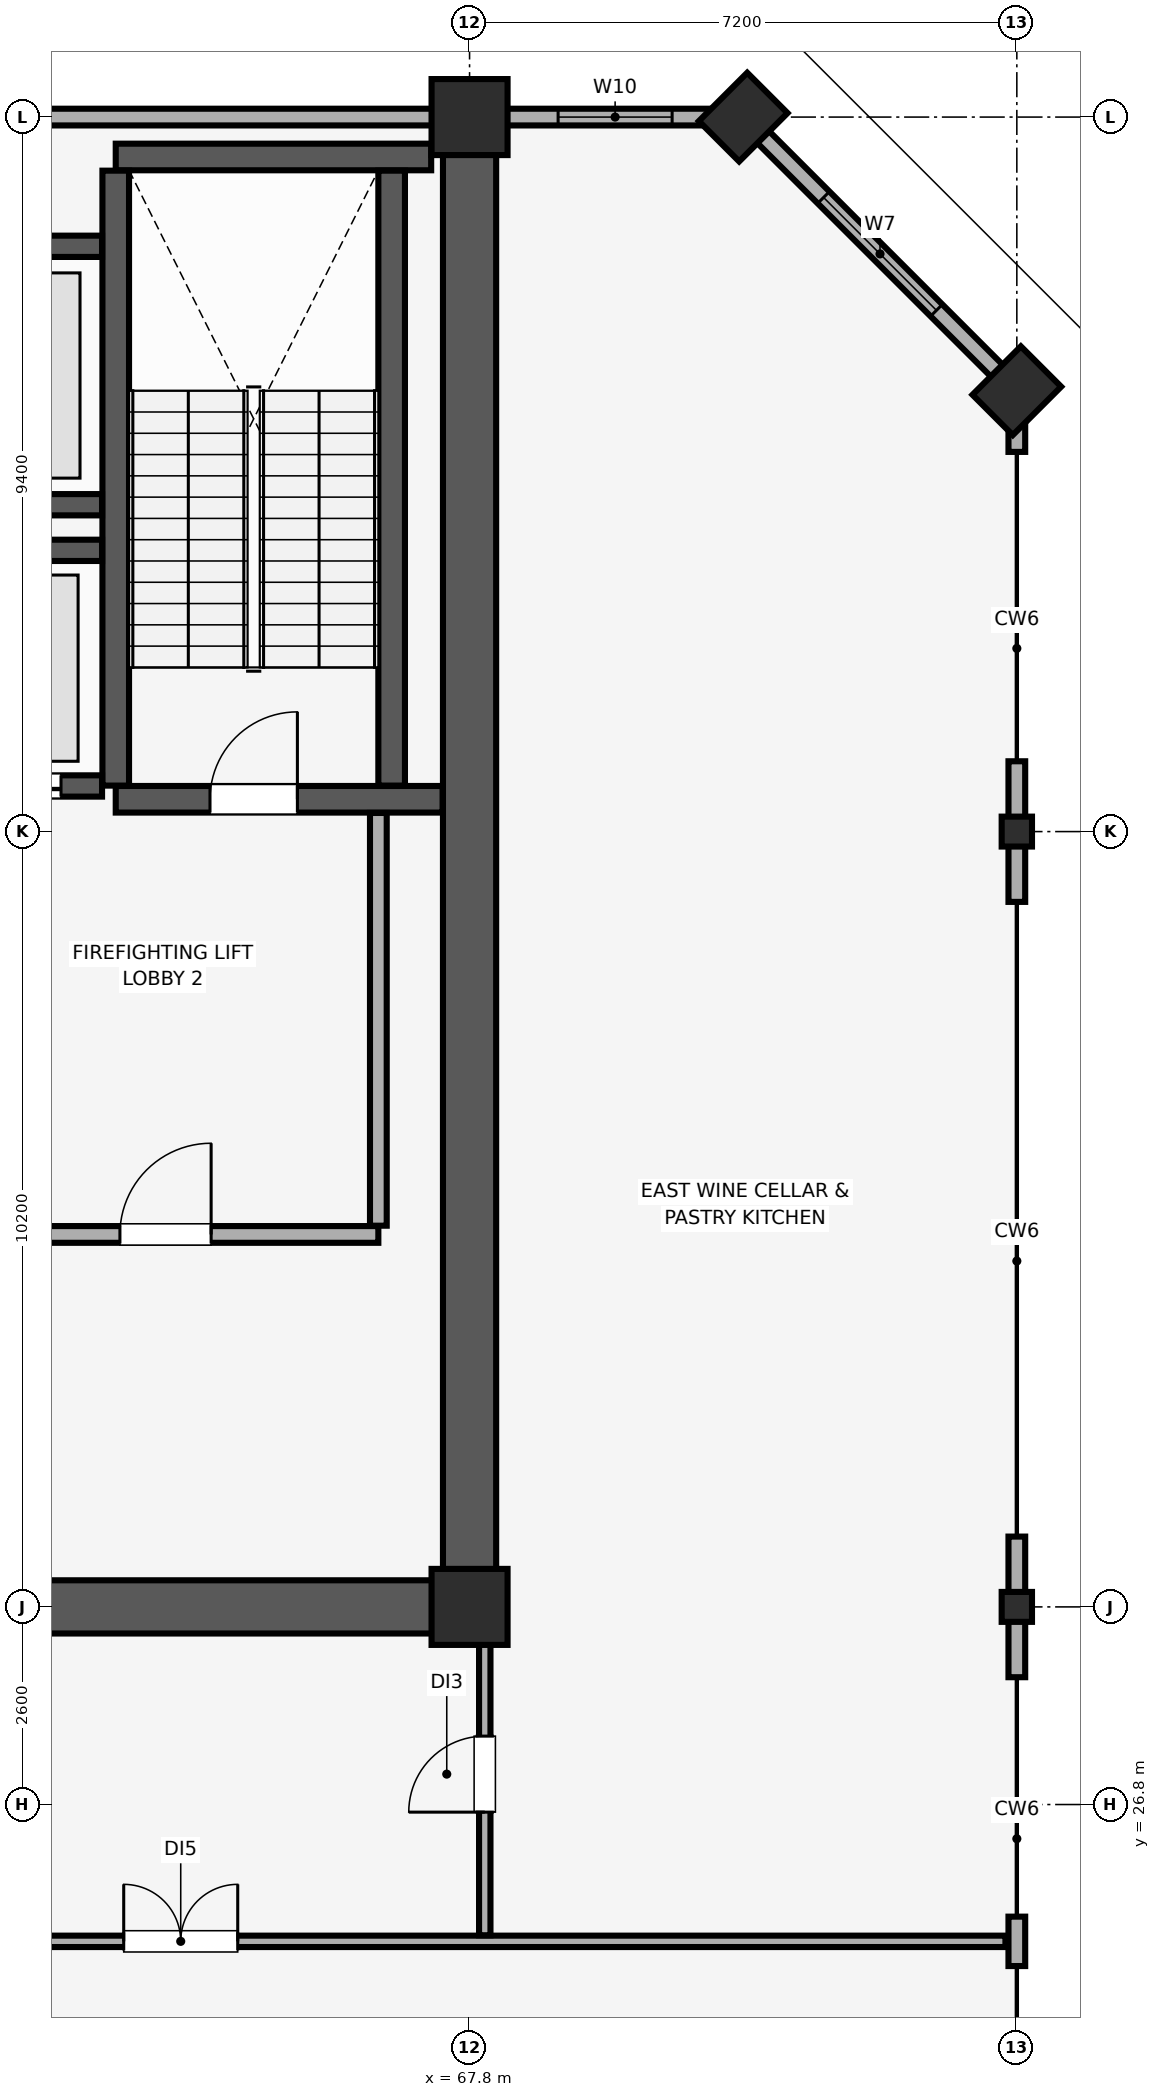
"""IFC4 building model, lengths in metres.
Left out: names, types, materials, properties, quantities, classifications, styles, units other than length and angle.
Written with IfcOpenShell. Run it as: python <this file> out.ifc"""

import sys

from ifc_helpers import new_model, si_unit, direction, frame, frame_2d, origin, origin_2d, place, context, subcontext, project, spatial, rectangle, i_section, extrude, element, fill, save


model = new_model("IFC4")
c1 = context("Model", 3, precision=1e-05, world=origin(), true_north=direction((0.0, 1.0)))
c2 = subcontext(c1, "Body", "Model", "MODEL_VIEW")
j1 = project(units=[si_unit("LENGTHUNIT", "METRE"), si_unit("PLANEANGLEUNIT", "RADIAN")], contexts=[c1])
p1 = place(None, origin())
s1 = spatial("IfcSite", under=j1, at=p1, CompositionType="ELEMENT")
p2 = place(p1, origin())
s2 = spatial("IfcBuilding", under=s1, at=p2, CompositionType="ELEMENT")
p3 = place(p2, frame((0.0, 0.0, 305.7)))
s3 = spatial("IfcBuildingStorey", under=s2, at=p3, CompositionType="ELEMENT", Elevation=305.7)
for number, where, z_axis, x_axis in (
    (1, (75.0, 29.4, 0.0), (0.0, 0.0, 1.0), (1.0, 0.0, 0.0)),
    (2, (75.0, 39.6, 0.0), (0.0, 0.0, 1.0), (1.0, 0.0, 0.0)),
):
    element("IfcColumn", number, at=place(p3, frame(where, z_axis=z_axis, x_axis=x_axis)), inside=s3, PredefinedType="COLUMN", context=c2, shape_type="SweptSolid", body=[
        extrude(i_section(OverallWidth=0.399, OverallDepth=0.394, WebThickness=0.023, FlangeThickness=0.037, FilletRadius=0.015, at=origin_2d()), origin(), (0.0, 0.0, 1.0), 4.7),
    ])
for number, where, z_axis, x_axis in (
    (3, (75.0, 45.4, 0.0), (0.0, 0.0, 1.0), (0.707, 0.707, 0.0)),
    (4, (71.4, 49.0, 0.0), (0.0, 0.0, 1.0), (0.707, 0.707, 0.0)),
):
    element("IfcColumn", number, at=place(p3, frame(where, z_axis=z_axis, x_axis=x_axis)), inside=s3, PredefinedType="PILASTER", context=c2, shape_type="SweptSolid", body=[
        extrude(rectangle(XDim=0.9, YDim=0.75, at=origin_2d()), origin(), (0.0, 0.0, 1.0), 4.7),
    ])
for number, where, z_axis, x_axis in (
    (5, (67.8, 29.4, 0.0), (0.0, 0.0, 1.0), (1.0, 0.0, 0.0)),
    (6, (67.8, 49.0, 0.0), (0.0, 0.0, 1.0), (1.0, 0.0, 0.0)),
):
    element("IfcColumn", number, at=place(p3, frame(where, z_axis=z_axis, x_axis=x_axis)), inside=s3, PredefinedType="COLUMN", context=c2, shape_type="SweptSolid", body=[
        extrude(rectangle(XDim=1.0, YDim=1.0, at=origin_2d()), origin(), (0.0, 0.0, 1.0), 4.7),
    ])
p4 = place(p3, frame((75.0, 24.675, 0.0), z_axis=(0.0, 0.0, 1.0), x_axis=(0.0, 1.0, 0.0)))
e7 = element("IfcWall", 7, at=p4, inside=s3, PredefinedType="SOLIDWALL", context=c2, shape_type="SweptSolid", body=[
    extrude(rectangle(XDim=0.65, YDim=0.22, at=frame_2d((0.325, 0.0))), origin(), (0.0, 0.0, 1.0), 3.9),
])
for number, where, z_axis, x_axis in (
    (8, (75.0, 28.475, 0.0), (0.0, 0.0, 1.0), (0.0, 1.0, 0.0)),
    (9, (75.0, 38.675, 0.0), (0.0, 0.0, 1.0), (0.0, 1.0, 0.0)),
):
    element("IfcWall", number, at=place(p3, frame(where, z_axis=z_axis, x_axis=x_axis)), inside=s3, PredefinedType="SOLIDWALL", context=c2, shape_type="SweptSolid", body=[
        extrude(rectangle(XDim=1.85, YDim=0.22, at=frame_2d((0.925, 0.0))), origin(), (0.0, 0.0, 1.0), 3.9),
    ])
p5 = place(p3, frame((75.0, 44.595, 0.0), z_axis=(0.0, 0.0, 1.0), x_axis=(0.0, 1.0, 0.0)))
e10 = element("IfcWall", 10, at=p5, inside=s3, PredefinedType="SOLIDWALL", context=c2, shape_type="SweptSolid", body=[
    extrude(rectangle(XDim=0.805, YDim=0.22, at=frame_2d((0.402, 0.0))), origin(), (0.0, 0.0, 1.0), 4.7),
])
p6 = place(p3, frame((75.0, 45.4, 0.0), z_axis=(0.0, 0.0, 1.0), x_axis=(-0.707106781187, 0.707106781187, 0.0)))
e11 = element("IfcWall", 11, at=p6, inside=s3, PredefinedType="SOLIDWALL", context=c2, shape_type="SweptSolid", body=[
    extrude(rectangle(XDim=5.091, YDim=0.22, at=frame_2d((2.546, 0.0))), origin(), (0.0, 0.0, 1.0), 3.9),
])
p7 = place(p6, frame((1.496, 0.0, 0.85)))
e12 = element("IfcOpeningElement", 12, at=p7, cuts=e11, PredefinedType="OPENING", context=c2, shape_type="SweptSolid", body=[
    extrude(rectangle(XDim=2.1, YDim=1.6, at=frame_2d((1.05, 0.8))), frame((0.0, 0.12, 0.0), z_axis=(0.0, -1.0, 0.0), x_axis=(1.0, 0.0, 0.0)), (0.0, 0.0, 1.0), 0.24),
])
p8 = place(p3, frame((71.4, 49.0, 0.0), z_axis=(0.0, 0.0, 1.0), x_axis=(-1.0, 0.0, 0.0)))
e13 = element("IfcWall", 13, at=p8, inside=s3, PredefinedType="SOLIDWALL", context=c2, shape_type="SweptSolid", body=[
    extrude(rectangle(XDim=58.8, YDim=0.22, at=frame_2d((29.4, 0.0))), origin(), (0.0, 0.0, 1.0), 3.9),
])
p9 = place(p8, frame((56.365, 0.0, 0.85)))
e14 = element("IfcOpeningElement", 14, at=p9, cuts=e13, PredefinedType="OPENING", context=c2, shape_type="SweptSolid", body=[
    extrude(rectangle(XDim=1.5, YDim=1.4, at=frame_2d((0.75, 0.7))), frame((0.0, 0.12, 0.0), z_axis=(0.0, -1.0, 0.0), x_axis=(1.0, 0.0, 0.0)), (0.0, 0.0, 1.0), 0.24),
])
p10 = place(p8, frame((0.935, 0.0, 0.85)))
e15 = element("IfcOpeningElement", 15, at=p10, cuts=e13, PredefinedType="OPENING", context=c2, shape_type="SweptSolid", body=[
    extrude(rectangle(XDim=1.5, YDim=1.4, at=frame_2d((0.75, 0.7))), frame((0.0, 0.12, 0.0), z_axis=(0.0, -1.0, 0.0), x_axis=(1.0, 0.0, 0.0)), (0.0, 0.0, 1.0), 0.24),
])
p11 = place(p8, frame((41.915, 0.0, 0.9)))
e16 = element("IfcOpeningElement", 16, at=p11, cuts=e13, PredefinedType="OPENING", context=c2, shape_type="SweptSolid", body=[
    extrude(rectangle(XDim=3.6, YDim=1.5, at=frame_2d((1.8, 0.75))), frame((0.0, 0.12, 0.0), z_axis=(0.0, -1.0, 0.0), x_axis=(1.0, 0.0, 0.0)), (0.0, 0.0, 1.0), 0.24),
])
p12 = place(p8, frame((35.7, 0.0, 0.9)))
e17 = element("IfcOpeningElement", 17, at=p12, cuts=e13, PredefinedType="OPENING", context=c2, shape_type="SweptSolid", body=[
    extrude(rectangle(XDim=2.4, YDim=1.5, at=frame_2d((1.2, 0.75))), frame((0.0, 0.12, 0.0), z_axis=(0.0, -1.0, 0.0), x_axis=(1.0, 0.0, 0.0)), (0.0, 0.0, 1.0), 0.24),
])
p13 = place(p8, frame((18.95, 0.0, 0.9)))
e18 = element("IfcOpeningElement", 18, at=p13, cuts=e13, PredefinedType="OPENING", context=c2, shape_type="SweptSolid", body=[
    extrude(rectangle(XDim=3.0, YDim=1.5, at=frame_2d((1.5, 0.75))), frame((0.0, 0.12, 0.0), z_axis=(0.0, -1.0, 0.0), x_axis=(1.0, 0.0, 0.0)), (0.0, 0.0, 1.0), 0.24),
])
p14 = place(p8, frame((14.635, 0.0, 0.9)))
e19 = element("IfcOpeningElement", 19, at=p14, cuts=e13, PredefinedType="OPENING", context=c2, shape_type="SweptSolid", body=[
    extrude(rectangle(XDim=2.4, YDim=1.5, at=frame_2d((1.2, 0.75))), frame((0.0, 0.12, 0.0), z_axis=(0.0, -1.0, 0.0), x_axis=(1.0, 0.0, 0.0)), (0.0, 0.0, 1.0), 0.24),
])
p15 = place(p3, frame((67.8, 29.4, 0.0), z_axis=(0.0, 0.0, 1.0), x_axis=(0.0, 1.0, 0.0)))
e20 = element("IfcWall", 20, at=p15, inside=s3, PredefinedType="SHEAR", context=c2, shape_type="SweptSolid", body=[
    extrude(rectangle(XDim=19.2, YDim=0.7, at=frame_2d((9.6, 0.0))), origin(), (0.0, 0.0, 1.0), 4.7),
])
p16 = place(p3, frame((60.4, 29.4, 0.0), z_axis=(0.0, 0.0, 1.0), x_axis=(1.0, 0.0, 0.0)))
e21 = element("IfcWall", 21, at=p16, inside=s3, PredefinedType="SHEAR", context=c2, shape_type="SweptSolid", body=[
    extrude(rectangle(XDim=7.045, YDim=0.7, at=frame_2d((3.522, 0.0))), origin(), (0.0, 0.0, 1.0), 4.7),
])
p17 = place(p3, frame((63.145, 40.025, 0.0), z_axis=(0.0, 0.0, 1.0), x_axis=(1.0, 0.0, 0.0)))
e22 = element("IfcWall", 22, at=p17, inside=s3, PredefinedType="SHEAR", context=c2, shape_type="SweptSolid", body=[
    extrude(rectangle(XDim=4.3, YDim=0.35, at=frame_2d((2.15, 0.0))), origin(), (0.0, 0.0, 1.0), 4.7),
])
p18 = place(p17, frame((1.24, 0.0, 0.0)))
e23 = element("IfcOpeningElement", 23, at=p18, cuts=e22, PredefinedType="OPENING", context=c2, shape_type="SweptSolid", body=[
    extrude(rectangle(XDim=1.15, YDim=2.15, at=frame_2d((0.575, 1.075))), frame((0.0, 0.185, 0.0), z_axis=(0.0, -1.0, 0.0), x_axis=(1.0, 0.0, 0.0)), (0.0, 0.0, 1.0), 0.37),
])
p19 = place(p3, frame((63.145, 48.475, 0.0), z_axis=(0.0, 0.0, 1.0), x_axis=(1.0, 0.0, 0.0)))
e24 = element("IfcWall", 24, at=p19, inside=s3, PredefinedType="SHEAR", context=c2, shape_type="SweptSolid", body=[
    extrude(rectangle(XDim=4.15, YDim=0.35, at=frame_2d((2.075, 0.0))), origin(), (0.0, 0.0, 1.0), 4.7),
])
for number, where, z_axis, x_axis in (
    (25, (63.145, 40.205, 0.0), (0.0, 0.0, 1.0), (0.0, 1.0, 0.0)),
    (26, (66.775, 40.205, 0.0), (0.0, 0.0, 1.0), (0.0, 1.0, 0.0)),
):
    element("IfcWall", number, at=place(p3, frame(where, z_axis=z_axis, x_axis=x_axis)), inside=s3, PredefinedType="SHEAR", context=c2, shape_type="SweptSolid", body=[
        extrude(rectangle(XDim=8.09, YDim=0.35, at=frame_2d((4.045, 0.0))), origin(), (0.0, 0.0, 1.0), 4.7),
    ])
p20 = place(p3, frame((60.55, 40.2, 0.0), z_axis=(0.0, 0.0, 1.0), x_axis=(1.0, 0.0, 0.0)))
e27 = element("IfcWall", 27, at=p20, inside=s3, PredefinedType="SHEAR", context=c2, shape_type="SweptSolid", body=[
    extrude(rectangle(XDim=2.415, YDim=0.28, at=frame_2d((1.208, 0.0))), origin(), (0.0, 0.0, 1.0), 4.7),
])
p21 = place(p20, frame((0.575, 0.0, 0.0)))
e28 = element("IfcOpeningElement", 28, at=p21, cuts=e27, PredefinedType="OPENING", context=c2, shape_type="SweptSolid", body=[
    extrude(rectangle(XDim=1.3, YDim=2.3, at=frame_2d((0.65, 1.15))), frame((0.0, 0.15, 0.0), z_axis=(0.0, -1.0, 0.0), x_axis=(1.0, 0.0, 0.0)), (0.0, 0.0, 1.0), 0.3),
])
for number, where, z_axis, x_axis in (
    (29, (60.55, 43.3, 0.0), (0.0, 0.0, 1.0), (1.0, 0.0, 0.0)),
    (30, (60.55, 43.9, 0.0), (0.0, 0.0, 1.0), (1.0, 0.0, 0.0)),
    (31, (60.55, 47.3, 0.0), (0.0, 0.0, 1.0), (1.0, 0.0, 0.0)),
):
    element("IfcWall", number, at=place(p3, frame(where, z_axis=z_axis, x_axis=x_axis)), inside=s3, PredefinedType="SHEAR", context=c2, shape_type="SweptSolid", body=[
        extrude(rectangle(XDim=2.415, YDim=0.28, at=frame_2d((1.208, 0.0))), origin(), (0.0, 0.0, 1.0), 4.7),
    ])
p22 = place(p3, frame((60.55, 34.3, 0.0), z_axis=(0.0, 0.0, 1.0), x_axis=(1.0, 0.0, 0.0)))
e32 = element("IfcWall", 32, at=p22, inside=s3, PredefinedType="PARTITIONING", context=c2, shape_type="SweptSolid", body=[
    extrude(rectangle(XDim=6.05, YDim=0.22, at=frame_2d((3.025, 0.0))), origin(), (0.0, 0.0, 1.0), 4.7),
])
p23 = place(p22, frame((2.65, 0.0, 0.0)))
e33 = element("IfcOpeningElement", 33, at=p23, cuts=e32, PredefinedType="OPENING", context=c2, shape_type="SweptSolid", body=[
    extrude(rectangle(XDim=1.2, YDim=2.15, at=frame_2d((0.6, 1.075))), frame((0.0, 0.12, 0.0), z_axis=(0.0, -1.0, 0.0), x_axis=(1.0, 0.0, 0.0)), (0.0, 0.0, 1.0), 0.24),
])
p24 = place(p3, frame((66.6, 34.415, 0.0), z_axis=(0.0, 0.0, 1.0), x_axis=(0.0, 1.0, 0.0)))
e34 = element("IfcWall", 34, at=p24, inside=s3, PredefinedType="PARTITIONING", context=c2, shape_type="SweptSolid", body=[
    extrude(rectangle(XDim=5.43, YDim=0.22, at=frame_2d((2.715, 0.0))), origin(), (0.0, 0.0, 1.0), 4.7),
])
p25 = place(p3, frame((58.68, 25.0, 0.0), z_axis=(0.0, 0.0, 1.0), x_axis=(1.0, 0.0, 0.0)))
e35 = element("IfcWall", 35, at=p25, inside=s3, PredefinedType="PARTITIONING", context=c2, shape_type="SweptSolid", body=[
    extrude(rectangle(XDim=16.17, YDim=0.15, at=frame_2d((8.085, 0.0))), origin(), (0.0, 0.0, 1.0), 4.7),
])
p26 = place(p25, frame((4.57, 0.0, 0.0)))
e36 = element("IfcOpeningElement", 36, at=p26, cuts=e35, PredefinedType="OPENING", context=c2, shape_type="SweptSolid", body=[
    extrude(rectangle(XDim=1.5, YDim=2.25, at=frame_2d((0.75, 1.125))), frame((0.0, 0.085, 0.0), z_axis=(0.0, -1.0, 0.0), x_axis=(1.0, 0.0, 0.0)), (0.0, 0.0, 1.0), 0.17),
])
p27 = place(p3, frame((68.0, 25.08, 0.0), z_axis=(0.0, 0.0, 1.0), x_axis=(0.0, 1.0, 0.0)))
e37 = element("IfcWall", 37, at=p27, inside=s3, PredefinedType="PARTITIONING", context=c2, shape_type="SweptSolid", body=[
    extrude(rectangle(XDim=4.31, YDim=0.15, at=frame_2d((2.155, 0.0))), origin(), (0.0, 0.0, 1.0), 4.7),
])
p28 = place(p27, frame((1.62, 0.0, 0.0)))
e38 = element("IfcOpeningElement", 38, at=p28, cuts=e37, PredefinedType="OPENING", context=c2, shape_type="SweptSolid", body=[
    extrude(rectangle(XDim=1.0, YDim=2.15, at=frame_2d((0.5, 1.075))), frame((0.0, 0.085, 0.0), z_axis=(0.0, -1.0, 0.0), x_axis=(1.0, 0.0, 0.0)), (0.0, 0.0, 1.0), 0.17),
])
p29 = place(p7, origin())
e39 = element("IfcWindow", 39, at=p29, inside=s3, PartitioningType="SINGLE_PANEL", PredefinedType="WINDOW", context=c2, shape_type="SweptSolid", body=[
    extrude(rectangle(XDim=2.1, YDim=1.6, at=frame_2d((1.05, 0.8))), frame((0.0, 0.03, 0.0), z_axis=(0.0, -1.0, 0.0), x_axis=(1.0, 0.0, 0.0)), (0.0, 0.0, 1.0), 0.06),
])
fill(e12, e39)
p30 = place(p10, origin())
e40 = element("IfcWindow", 40, at=p30, inside=s3, PartitioningType="SINGLE_PANEL", PredefinedType="WINDOW", context=c2, shape_type="SweptSolid", body=[
    extrude(rectangle(XDim=1.5, YDim=1.4, at=frame_2d((0.75, 0.7))), frame((0.0, 0.03, 0.0), z_axis=(0.0, -1.0, 0.0), x_axis=(1.0, 0.0, 0.0)), (0.0, 0.0, 1.0), 0.06),
])
fill(e15, e40)
p31 = place(p18, origin())
e41 = element("IfcDoor", 41, at=p31, inside=s3, OperationType="SINGLE_SWING_RIGHT", PredefinedType="DOOR", context=c2, shape_type="SweptSolid", body=[
    extrude(rectangle(XDim=1.15, YDim=2.15, at=frame_2d((0.575, 1.075))), frame((0.0, 0.025, 0.0), z_axis=(0.0, -1.0, 0.0), x_axis=(1.0, 0.0, 0.0)), (0.0, 0.0, 1.0), 0.05),
])
fill(e23, e41)
p32 = place(p21, origin())
e42 = element("IfcDoor", 42, at=p32, inside=s3, OperationType="DOUBLE_DOOR_SLIDING", PredefinedType="DOOR", context=c2, shape_type="SweptSolid", body=[
    extrude(rectangle(XDim=1.3, YDim=2.3, at=frame_2d((0.65, 1.15))), frame((0.0, 0.025, 0.0), z_axis=(0.0, -1.0, 0.0), x_axis=(1.0, 0.0, 0.0)), (0.0, 0.0, 1.0), 0.05),
])
fill(e28, e42)
p33 = place(p23, origin())
e43 = element("IfcDoor", 43, at=p33, inside=s3, OperationType="SINGLE_SWING_RIGHT", PredefinedType="DOOR", context=c2, shape_type="SweptSolid", body=[
    extrude(rectangle(XDim=1.2, YDim=2.15, at=frame_2d((0.6, 1.075))), frame((0.0, 0.025, 0.0), z_axis=(0.0, -1.0, 0.0), x_axis=(1.0, 0.0, 0.0)), (0.0, 0.0, 1.0), 0.05),
])
fill(e33, e43)
p34 = place(p26, origin())
e44 = element("IfcDoor", 44, at=p34, inside=s3, OperationType="DOUBLE_DOOR_SINGLE_SWING", PredefinedType="DOOR", context=c2, shape_type="SweptSolid", body=[
    extrude(rectangle(XDim=1.5, YDim=2.25, at=frame_2d((0.75, 1.125))), frame((0.0, 0.025, 0.0), z_axis=(0.0, -1.0, 0.0), x_axis=(1.0, 0.0, 0.0)), (0.0, 0.0, 1.0), 0.05),
])
fill(e36, e44)
p35 = place(p28, origin())
e45 = element("IfcDoor", 45, at=p35, inside=s3, OperationType="SINGLE_SWING_LEFT", PredefinedType="DOOR", context=c2, shape_type="SweptSolid", body=[
    extrude(rectangle(XDim=1.0, YDim=2.15, at=frame_2d((0.5, 1.075))), frame((0.0, 0.025, 0.0), z_axis=(0.0, -1.0, 0.0), x_axis=(1.0, 0.0, 0.0)), (0.0, 0.0, 1.0), 0.05),
])
fill(e38, e45)
save(model, sys.argv[1])
